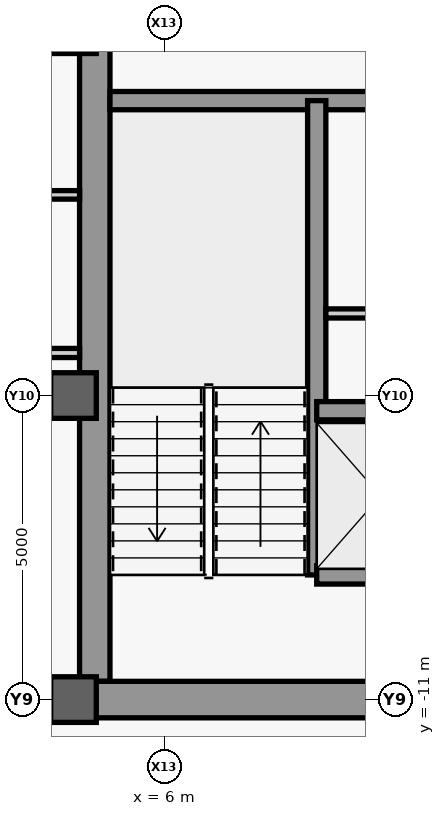
"""IFC4 building model, lengths in metres.
Left out: names, types, materials, properties, quantities, classifications, styles, units other than length and angle.
Written with IfcOpenShell. Run it as: python <this file> out.ifc"""

import sys

from ifc_helpers import new_model, si_unit, direction, frame, frame_2d, origin, origin_2d, place, context, subcontext, project, spatial, rectangle, extrude, source, transform, mapped, element, save


model = new_model("IFC4")
c1 = context("Model", 3, precision=1e-05, world=origin(), true_north=direction((0.0, 1.0)))
c2 = subcontext(c1, "Body", "Model", "MODEL_VIEW")
j1 = project(units=[si_unit("LENGTHUNIT", "METRE"), si_unit("PLANEANGLEUNIT", "RADIAN")], contexts=[c1])
p1 = place(None, origin())
s1 = spatial("IfcSite", under=j1, at=p1, CompositionType="ELEMENT")
p2 = place(p1, origin())
s2 = spatial("IfcBuilding", under=s1, at=p2, CompositionType="ELEMENT")
p3 = place(p2, frame((0.0, 0.0, 289.5)))
s3 = spatial("IfcBuildingStorey", under=s2, at=p3, CompositionType="ELEMENT", Elevation=289.5)
m1 = source(origin(), c2, "Body", "SweptSolid", [
    extrude(rectangle(XDim=21.4, YDim=0.5, at=frame_2d((10.7, 0.0))), origin(), (0.0, 0.0, 1.0), 3.78),
])
p4 = place(p3, frame((4.85, -10.7, 0.0), z_axis=(0.0, 0.0, 1.0), x_axis=(0.0, 1.0, 0.0)))
e1 = element("IfcWall", 1, at=p4, inside=s3, PredefinedType="SHEAR", context=c2, shape_type="MappedRepresentation", body=[
    mapped(m1, transform((0.0, 0.0, 0.0), scale=1.0)),
])
m2 = source(origin(), c2, "Body", "SweptSolid", [
    extrude(rectangle(XDim=5.9, YDim=0.6, at=frame_2d((2.95, 0.0))), origin(), (0.0, 0.0, 1.0), 3.78),
])
p5 = place(p3, frame((4.85, -11.0, 0.0), z_axis=(0.0, 0.0, 1.0), x_axis=(1.0, 0.0, 0.0)))
e2 = element("IfcWall", 2, at=p5, inside=s3, PredefinedType="SHEAR", context=c2, shape_type="MappedRepresentation", body=[
    mapped(m2, transform((0.0, 0.0, 0.0), scale=1.0)),
])
m3 = source(origin(), c2, "Body", "SweptSolid", [
    extrude(rectangle(XDim=5.65, YDim=0.3, at=frame_2d((2.825, 0.0))), origin(), (0.0, 0.0, 1.0), 3.78),
])
p6 = place(p3, frame((5.1, -1.15, 0.0), z_axis=(0.0, 0.0, 1.0), x_axis=(1.0, 0.0, 0.0)))
e3 = element("IfcWall", 3, at=p6, inside=s3, PredefinedType="SHEAR", context=c2, shape_type="MappedRepresentation", body=[
    mapped(m3, transform((0.0, 0.0, 0.0), scale=1.0)),
])
m4 = source(origin(), c2, "Body", "SweptSolid", [
    extrude(rectangle(XDim=9.2, YDim=0.5, at=frame_2d((4.6, 0.0))), origin(), (0.0, 0.0, 1.0), 3.78),
])
p7 = place(p3, frame((-4.6, -11.0, 0.0), z_axis=(0.0, 0.0, 1.0), x_axis=(1.0, 0.0, 0.0)))
e4 = element("IfcWall", 4, at=p7, inside=s3, PredefinedType="SHEAR", context=c2, shape_type="MappedRepresentation", body=[
    mapped(m4, transform((0.0, 0.0, 0.0), scale=1.0)),
])
m5 = source(origin(), c2, "Body", "SweptSolid", [
    extrude(rectangle(XDim=1.8, YDim=2.25, at=frame_2d((0.9, 1.125))), frame((0.0, 0.26, 0.0), z_axis=(0.0, -1.0, 0.0), x_axis=(1.0, 0.0, 0.0)), (0.0, 0.0, 1.0), 0.52),
])
p8 = place(p7, frame((3.7, 0.0, 0.0)))
e5 = element("IfcOpeningElement", 5, at=p8, cuts=e4, PredefinedType="OPENING", context=c2, shape_type="MappedRepresentation", body=[
    mapped(m5, transform((0.0, 0.0, 0.0), scale=1.0)),
])
m6 = source(origin(), c2, "Body", "SweptSolid", [
    extrude(rectangle(XDim=0.75, YDim=0.75, at=origin_2d()), origin(), (0.0, 0.0, 1.0), 4.0),
])
for number, where, z_axis, x_axis in (
    (6, (4.5, -11.0, 0.0), (0.0, 0.0, 1.0), (1.0, 0.0, 0.0)),
    (7, (4.5, -6.0, 0.0), (0.0, 0.0, 1.0), (1.0, 0.0, 0.0)),
    (8, (4.5, 0.0, 0.0), (0.0, 0.0, 1.0), (1.0, 0.0, 0.0)),
):
    element("IfcColumn", number, at=place(p3, frame(where, z_axis=z_axis, x_axis=x_axis)), inside=s3, PredefinedType="COLUMN", context=c2, shape_type="MappedRepresentation", body=[
        mapped(m6, transform((0.0, 0.0, 0.0), scale=1.0)),
    ])
m7 = source(origin(), c2, "Body", "SweptSolid", [
    extrude(rectangle(XDim=7.8, YDim=0.3, at=frame_2d((3.9, 0.0))), origin(), (0.0, 0.0, 1.0), 3.78),
])
p9 = place(p3, frame((8.5, -8.95, 0.0), z_axis=(0.0, 0.0, 1.0), x_axis=(0.0, 1.0, 0.0)))
e9 = element("IfcWall", 9, at=p9, inside=s3, PredefinedType="SHEAR", context=c2, shape_type="MappedRepresentation", body=[
    mapped(m7, transform((0.0, 0.0, 0.0), scale=1.0)),
])
m8 = source(origin(), c2, "Body", "SweptSolid", [
    extrude(rectangle(XDim=2.2, YDim=0.3, at=frame_2d((1.1, 0.0))), origin(), (0.0, 0.0, 1.0), 3.78),
])
for number, where, z_axis, x_axis in (
    (10, (8.5, -8.95, 0.0), (0.0, 0.0, 1.0), (1.0, 0.0, 0.0)),
    (11, (8.5, -6.25, 0.0), (0.0, 0.0, 1.0), (1.0, 0.0, 0.0)),
):
    element("IfcWall", number, at=place(p3, frame(where, z_axis=z_axis, x_axis=x_axis)), inside=s3, PredefinedType="SHEAR", context=c2, shape_type="MappedRepresentation", body=[
        mapped(m8, transform((0.0, 0.0, 0.0), scale=1.0)),
    ])
m9 = source(origin(), c2, "Body", "SweptSolid", [
    extrude(rectangle(XDim=2.05, YDim=0.15, at=frame_2d((1.025, 0.0))), origin(), (0.0, 0.0, 1.0), 3.78),
])
p10 = place(p3, frame((8.65, -4.65, 0.0), z_axis=(0.0, 0.0, 1.0), x_axis=(1.0, 0.0, 0.0)))
e12 = element("IfcWall", 12, at=p10, inside=s3, PredefinedType="PARTITIONING", context=c2, shape_type="MappedRepresentation", body=[
    mapped(m9, transform((0.0, 0.0, 0.0), scale=1.0)),
])
m10 = source(origin(), c2, "Body", "SweptSolid", [
    extrude(rectangle(XDim=3.45, YDim=0.15, at=frame_2d((1.725, 0.0))), origin(), (0.0, 0.0, 1.0), 3.78),
])
p11 = place(p3, frame((1.15, -5.3, 0.0), z_axis=(0.0, 0.0, 1.0), x_axis=(1.0, 0.0, 0.0)))
e13 = element("IfcWall", 13, at=p11, inside=s3, PredefinedType="PARTITIONING", context=c2, shape_type="MappedRepresentation", body=[
    mapped(m10, transform((0.0, 0.0, 0.0), scale=1.0)),
])
m11 = source(origin(), c2, "Body", "SweptSolid", [
    extrude(rectangle(XDim=3.45, YDim=0.14, at=frame_2d((1.725, 0.0))), origin(), (0.0, 0.0, 1.0), 3.78),
])
p12 = place(p3, frame((1.15, -2.7, 0.0), z_axis=(0.0, 0.0, 1.0), x_axis=(1.0, 0.0, 0.0)))
e14 = element("IfcWall", 14, at=p12, inside=s3, PredefinedType="PARTITIONING", context=c2, shape_type="MappedRepresentation", body=[
    mapped(m11, transform((0.0, 0.0, 0.0), scale=1.0)),
])
save(model, sys.argv[1])
